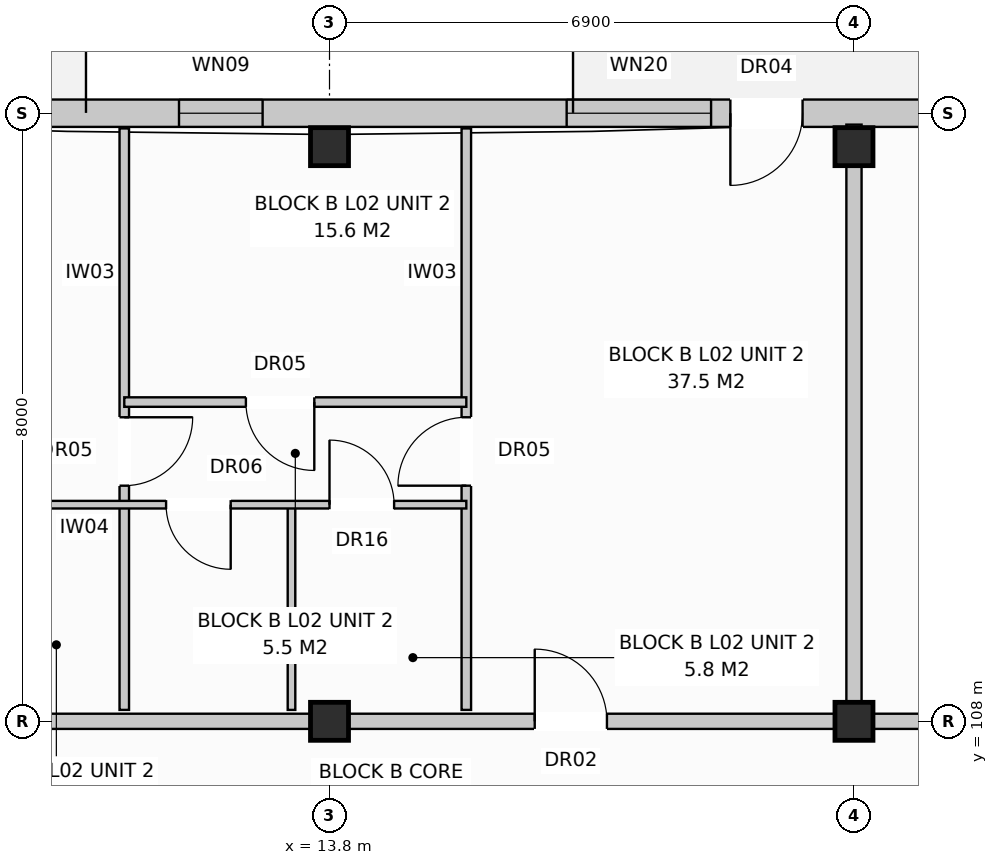
"""IFC4 building model, lengths in metres.
Left out: names, types, materials, properties, quantities, classifications, styles, units other than length and angle.
Written with IfcOpenShell. Run it as: python <this file> out.ifc"""

import sys

from ifc_helpers import new_model, si_unit, direction, frame, frame_2d, origin, origin_with_axes, origin_2d, place, context, subcontext, project, spatial, rectangle, extrude, element, fill, save


model = new_model("IFC4")
c1 = context("Model", 3, precision=1e-05, world=origin(), true_north=direction((0.0, 1.0)))
c2 = subcontext(c1, "Body", "Model", "MODEL_VIEW")
j1 = project(units=[si_unit("LENGTHUNIT", "METRE"), si_unit("PLANEANGLEUNIT", "RADIAN")], contexts=[c1])
p1 = place(None, origin())
s1 = spatial("IfcSite", under=j1, at=p1, CompositionType="ELEMENT")
p2 = place(p1, origin())
s2 = spatial("IfcBuilding", under=s1, at=p2, CompositionType="ELEMENT")
p3 = place(p2, frame((0.0, 0.0, 8.0)))
s3 = spatial("IfcBuildingStorey", under=s2, at=p3, CompositionType="ELEMENT", Elevation=8.0)
for number, where, z_axis, x_axis in (
    (1, (13.8, 108.0, 0.0), (0.0, 0.0, 1.0), (1.0, 0.0, 0.0)),
    (2, (13.8, 115.56, 0.0), (0.0, 0.0, 1.0), (1.0, 0.0, 0.0)),
    (3, (20.7, 108.0, 0.0), (0.0, 0.0, 1.0), (1.0, 0.0, 0.0)),
    (4, (20.7, 115.56, 0.0), (0.0, 0.0, 1.0), (1.0, 0.0, 0.0)),
):
    element("IfcColumn", number, at=place(p3, frame(where, z_axis=z_axis, x_axis=x_axis)), inside=s3, PredefinedType="COLUMN", context=c2, shape_type="SweptSolid", body=[
        extrude(rectangle(XDim=0.5, YDim=0.5, at=origin_2d()), origin(), (0.0, 0.0, 1.0), 3.2),
    ])
p4 = place(p3, frame((0.17, 116.0, 0.0), z_axis=(0.0, 0.0, 1.0), x_axis=(1.0, 0.0, 0.0)))
e5 = element("IfcWall", 5, at=p4, inside=s3, PredefinedType="STANDARD", context=c2, shape_type="SweptSolid", body=[
    extrude(rectangle(XDim=54.86, YDim=0.36, at=frame_2d((27.43, 0.0))), origin(), (0.0, 0.0, 1.0), 2.94),
])
p5 = place(p4, frame((5.1, 0.0, 0.0)))
e6 = element("IfcOpeningElement", 6, at=p5, cuts=e5, PredefinedType="OPENING", context=c2, shape_type="SweptSolid", body=[
    extrude(rectangle(XDim=0.95, YDim=2.1, at=frame_2d((0.475, 1.05))), frame((0.0, 0.192, 0.0), z_axis=(0.0, -1.0, 0.0), x_axis=(1.0, 0.0, 0.0)), (0.0, 0.0, 1.0), 0.384),
])
p6 = place(p4, frame((18.904, 0.0, 0.0)))
e7 = element("IfcOpeningElement", 7, at=p6, cuts=e5, PredefinedType="OPENING", context=c2, shape_type="SweptSolid", body=[
    extrude(rectangle(XDim=0.95, YDim=2.1, at=frame_2d((0.475, 1.05))), frame((0.0, 0.192, 0.0), z_axis=(0.0, -1.0, 0.0), x_axis=(1.0, 0.0, 0.0)), (0.0, 0.0, 1.0), 0.384),
])
p7 = place(p4, frame((32.704, 0.0, 0.0)))
e8 = element("IfcOpeningElement", 8, at=p7, cuts=e5, PredefinedType="OPENING", context=c2, shape_type="SweptSolid", body=[
    extrude(rectangle(XDim=0.95, YDim=2.1, at=frame_2d((0.475, 1.05))), frame((0.0, 0.192, 0.0), z_axis=(0.0, -1.0, 0.0), x_axis=(1.0, 0.0, 0.0)), (0.0, 0.0, 1.0), 0.384),
])
p8 = place(p4, frame((44.626, 0.0, 0.0)))
e9 = element("IfcOpeningElement", 9, at=p8, cuts=e5, PredefinedType="OPENING", context=c2, shape_type="SweptSolid", body=[
    extrude(rectangle(XDim=0.95, YDim=2.1, at=frame_2d((0.475, 1.05))), frame((0.0, 0.192, 0.0), z_axis=(0.0, -1.0, 0.0), x_axis=(1.0, 0.0, 0.0)), (0.0, 0.0, 1.0), 0.384),
])
p9 = place(p4, frame((1.25, 0.0, 0.72)))
e10 = element("IfcOpeningElement", 10, at=p9, cuts=e5, PredefinedType="OPENING", context=c2, shape_type="SweptSolid", body=[
    extrude(rectangle(XDim=1.1, YDim=1.5, at=frame_2d((0.55, 0.75))), frame((0.0, 0.192, 0.0), z_axis=(0.0, -1.0, 0.0), x_axis=(1.0, 0.0, 0.0)), (0.0, 0.0, 1.0), 0.384),
])
p10 = place(p4, frame((7.925, 0.0, 0.8)))
e11 = element("IfcOpeningElement", 11, at=p10, cuts=e5, PredefinedType="OPENING", context=c2, shape_type="SweptSolid", body=[
    extrude(rectangle(XDim=1.95, YDim=1.65, at=frame_2d((0.975, 0.825))), frame((0.0, 0.192, 0.0), z_axis=(0.0, -1.0, 0.0), x_axis=(1.0, 0.0, 0.0)), (0.0, 0.0, 1.0), 0.384),
])
p11 = place(p4, frame((11.65, 0.0, 0.72)))
e12 = element("IfcOpeningElement", 12, at=p11, cuts=e5, PredefinedType="OPENING", context=c2, shape_type="SweptSolid", body=[
    extrude(rectangle(XDim=1.1, YDim=1.5, at=frame_2d((0.55, 0.75))), frame((0.0, 0.192, 0.0), z_axis=(0.0, -1.0, 0.0), x_axis=(1.0, 0.0, 0.0)), (0.0, 0.0, 1.0), 0.384),
])
p12 = place(p4, frame((16.75, 0.0, 0.8)))
e13 = element("IfcOpeningElement", 13, at=p12, cuts=e5, PredefinedType="OPENING", context=c2, shape_type="SweptSolid", body=[
    extrude(rectangle(XDim=1.9, YDim=1.85, at=frame_2d((0.95, 0.925))), frame((0.0, 0.192, 0.0), z_axis=(0.0, -1.0, 0.0), x_axis=(1.0, 0.0, 0.0)), (0.0, 0.0, 1.0), 0.384),
])
p13 = place(p4, frame((22.225, 0.0, 0.8)))
e14 = element("IfcOpeningElement", 14, at=p13, cuts=e5, PredefinedType="OPENING", context=c2, shape_type="SweptSolid", body=[
    extrude(rectangle(XDim=1.95, YDim=1.65, at=frame_2d((0.975, 0.825))), frame((0.0, 0.192, 0.0), z_axis=(0.0, -1.0, 0.0), x_axis=(1.0, 0.0, 0.0)), (0.0, 0.0, 1.0), 0.384),
])
p14 = place(p4, frame((28.35, 0.0, 0.72)))
e15 = element("IfcOpeningElement", 15, at=p14, cuts=e5, PredefinedType="OPENING", context=c2, shape_type="SweptSolid", body=[
    extrude(rectangle(XDim=1.1, YDim=1.5, at=frame_2d((0.55, 0.75))), frame((0.0, 0.192, 0.0), z_axis=(0.0, -1.0, 0.0), x_axis=(1.0, 0.0, 0.0)), (0.0, 0.0, 1.0), 0.384),
])
p15 = place(p4, frame((30.55, 0.0, 0.8)))
e16 = element("IfcOpeningElement", 16, at=p15, cuts=e5, PredefinedType="OPENING", context=c2, shape_type="SweptSolid", body=[
    extrude(rectangle(XDim=1.9, YDim=1.85, at=frame_2d((0.95, 0.925))), frame((0.0, 0.192, 0.0), z_axis=(0.0, -1.0, 0.0), x_axis=(1.0, 0.0, 0.0)), (0.0, 0.0, 1.0), 0.384),
])
p16 = place(p4, frame((36.525, 0.0, 0.8)))
e17 = element("IfcOpeningElement", 17, at=p16, cuts=e5, PredefinedType="OPENING", context=c2, shape_type="SweptSolid", body=[
    extrude(rectangle(XDim=1.95, YDim=1.65, at=frame_2d((0.975, 0.825))), frame((0.0, 0.192, 0.0), z_axis=(0.0, -1.0, 0.0), x_axis=(1.0, 0.0, 0.0)), (0.0, 0.0, 1.0), 0.384),
])
p17 = place(p4, frame((42.65, 0.0, 0.72)))
e18 = element("IfcOpeningElement", 18, at=p17, cuts=e5, PredefinedType="OPENING", context=c2, shape_type="SweptSolid", body=[
    extrude(rectangle(XDim=1.1, YDim=1.5, at=frame_2d((0.55, 0.75))), frame((0.0, 0.192, 0.0), z_axis=(0.0, -1.0, 0.0), x_axis=(1.0, 0.0, 0.0)), (0.0, 0.0, 1.0), 0.384),
])
p18 = place(p4, frame((48.65, 0.0, 0.72)))
e19 = element("IfcOpeningElement", 19, at=p18, cuts=e5, PredefinedType="OPENING", context=c2, shape_type="SweptSolid", body=[
    extrude(rectangle(XDim=1.9, YDim=1.85, at=frame_2d((0.95, 0.925))), frame((0.0, 0.192, 0.0), z_axis=(0.0, -1.0, 0.0), x_axis=(1.0, 0.0, 0.0)), (0.0, 0.0, 1.0), 0.384),
])
p19 = place(p4, frame((52.45, 0.0, 0.72)))
e20 = element("IfcOpeningElement", 20, at=p19, cuts=e5, PredefinedType="OPENING", context=c2, shape_type="SweptSolid", body=[
    extrude(rectangle(XDim=1.1, YDim=1.5, at=frame_2d((0.55, 0.75))), frame((0.0, 0.192, 0.0), z_axis=(0.0, -1.0, 0.0), x_axis=(1.0, 0.0, 0.0)), (0.0, 0.0, 1.0), 0.384),
])
p20 = place(p3, frame((20.7, 108.15, 0.0), z_axis=(0.0, 0.0, 1.0), x_axis=(0.0, 1.0, 0.0)))
e21 = element("IfcWall", 21, at=p20, inside=s3, PredefinedType="PARTITIONING", context=c2, shape_type="SweptSolid", body=[
    extrude(rectangle(XDim=7.7, YDim=0.2, at=frame_2d((3.85, 0.0))), origin(), (0.0, 0.0, 1.0), 2.94),
])
p21 = place(p3, frame((6.9, 108.0, 0.0), z_axis=(0.0, 0.0, 1.0), x_axis=(1.0, 0.0, 0.0)))
e22 = element("IfcWall", 22, at=p21, inside=s3, PredefinedType="PARTITIONING", context=c2, shape_type="SweptSolid", body=[
    extrude(rectangle(XDim=13.8, YDim=0.2, at=frame_2d((6.9, 0.0))), origin(), (0.0, 0.0, 1.0), 2.38),
])
p22 = place(p21, frame((9.6, 0.0, 0.0)))
e23 = element("IfcOpeningElement", 23, at=p22, cuts=e22, PredefinedType="OPENING", context=c2, shape_type="SweptSolid", body=[
    extrude(rectangle(XDim=0.95, YDim=2.15, at=frame_2d((0.475, 1.075))), frame((0.0, 0.112, 0.0), z_axis=(0.0, -1.0, 0.0), x_axis=(1.0, 0.0, 0.0)), (0.0, 0.0, 1.0), 0.224),
])
p23 = place(p3, frame((15.6, 108.15, 0.0), z_axis=(0.0, 0.0, 1.0), x_axis=(0.0, 1.0, 0.0)))
e24 = element("IfcWall", 24, at=p23, inside=s3, PredefinedType="PARTITIONING", context=c2, shape_type="SweptSolid", body=[
    extrude(rectangle(XDim=7.65, YDim=0.125, at=frame_2d((3.825, 0.0))), origin(), (0.0, 0.0, 1.0), 2.94),
])
p24 = place(p23, frame((2.95, 0.0, 0.0)))
e25 = element("IfcOpeningElement", 25, at=p24, cuts=e24, PredefinedType="OPENING", context=c2, shape_type="SweptSolid", body=[
    extrude(rectangle(XDim=0.9, YDim=2.1, at=frame_2d((0.45, 1.05))), frame((0.0, 0.074, 0.0), z_axis=(0.0, -1.0, 0.0), x_axis=(1.0, 0.0, 0.0)), (0.0, 0.0, 1.0), 0.149),
])
p25 = place(p3, frame((11.1, 108.15, 0.0), z_axis=(0.0, 0.0, 1.0), x_axis=(0.0, 1.0, 0.0)))
e26 = element("IfcWall", 26, at=p25, inside=s3, PredefinedType="PARTITIONING", context=c2, shape_type="SweptSolid", body=[
    extrude(rectangle(XDim=7.65, YDim=0.125, at=frame_2d((3.825, 0.0))), origin(), (0.0, 0.0, 1.0), 2.94),
])
p26 = place(p25, frame((2.95, 0.0, 0.0)))
e27 = element("IfcOpeningElement", 27, at=p26, cuts=e26, PredefinedType="OPENING", context=c2, shape_type="SweptSolid", body=[
    extrude(rectangle(XDim=0.9, YDim=2.1, at=frame_2d((0.45, 1.05))), frame((0.0, 0.074, 0.0), z_axis=(0.0, -1.0, 0.0), x_axis=(1.0, 0.0, 0.0)), (0.0, 0.0, 1.0), 0.149),
])
p27 = place(p3, frame((13.3, 108.15, 0.0), z_axis=(0.0, 0.0, 1.0), x_axis=(0.0, 1.0, 0.0)))
e28 = element("IfcWall", 28, at=p27, inside=s3, PredefinedType="PARTITIONING", context=c2, shape_type="SweptSolid", body=[
    extrude(rectangle(XDim=2.7, YDim=0.1, at=frame_2d((1.35, 0.0))), origin(), (0.0, 0.0, 1.0), 2.94),
])
p28 = place(p3, frame((7.0, 110.85, 0.0), z_axis=(0.0, 0.0, 1.0), x_axis=(1.0, 0.0, 0.0)))
e29 = element("IfcWall", 29, at=p28, inside=s3, PredefinedType="PARTITIONING", context=c2, shape_type="SweptSolid", body=[
    extrude(rectangle(XDim=8.6, YDim=0.1, at=frame_2d((4.3, 0.0))), origin(), (0.0, 0.0, 1.0), 2.94),
])
p29 = place(p28, frame((1.4, 0.0, 0.0)))
e30 = element("IfcOpeningElement", 30, at=p29, cuts=e29, PredefinedType="OPENING", context=c2, shape_type="SweptSolid", body=[
    extrude(rectangle(XDim=0.85, YDim=2.05, at=frame_2d((0.425, 1.025))), frame((0.0, 0.062, 0.0), z_axis=(0.0, -1.0, 0.0), x_axis=(1.0, 0.0, 0.0)), (0.0, 0.0, 1.0), 0.124),
])
p30 = place(p28, frame((4.65, 0.0, 0.0)))
e31 = element("IfcOpeningElement", 31, at=p30, cuts=e29, PredefinedType="OPENING", context=c2, shape_type="SweptSolid", body=[
    extrude(rectangle(XDim=0.85, YDim=2.05, at=frame_2d((0.425, 1.025))), frame((0.0, 0.062, 0.0), z_axis=(0.0, -1.0, 0.0), x_axis=(1.0, 0.0, 0.0)), (0.0, 0.0, 1.0), 0.124),
])
p31 = place(p28, frame((6.8, 0.0, 0.0)))
e32 = element("IfcOpeningElement", 32, at=p31, cuts=e29, PredefinedType="OPENING", context=c2, shape_type="SweptSolid", body=[
    extrude(rectangle(XDim=0.85, YDim=2.1, at=frame_2d((0.425, 1.05))), frame((0.0, 0.062, 0.0), z_axis=(0.0, -1.0, 0.0), x_axis=(1.0, 0.0, 0.0)), (0.0, 0.0, 1.0), 0.124),
])
p32 = place(p3, frame((11.1, 112.2, 0.0), z_axis=(0.0, 0.0, 1.0), x_axis=(1.0, 0.0, 0.0)))
e33 = element("IfcWall", 33, at=p32, inside=s3, PredefinedType="PARTITIONING", context=c2, shape_type="SweptSolid", body=[
    extrude(rectangle(XDim=4.5, YDim=0.125, at=frame_2d((2.25, 0.0))), origin(), (0.0, 0.0, 1.0), 2.94),
])
p33 = place(p32, frame((1.6, 0.0, 0.0)))
e34 = element("IfcOpeningElement", 34, at=p33, cuts=e33, PredefinedType="OPENING", context=c2, shape_type="SweptSolid", body=[
    extrude(rectangle(XDim=0.9, YDim=2.1, at=frame_2d((0.45, 1.05))), frame((0.0, 0.074, 0.0), z_axis=(0.0, -1.0, 0.0), x_axis=(1.0, 0.0, 0.0)), (0.0, 0.0, 1.0), 0.149),
])
p34 = place(p3, frame((20.7, 108.0, 0.0), z_axis=(0.0, 0.0, 1.0), x_axis=(1.0, 0.0, 0.0)))
e35 = element("IfcWall", 35, at=p34, inside=s3, PredefinedType="PARTITIONING", context=c2, shape_type="SweptSolid", body=[
    extrude(rectangle(XDim=13.8, YDim=0.2, at=frame_2d((6.9, 0.0))), origin(), (0.0, 0.0, 1.0), 2.38),
])
p35 = place(p34, frame((2.4, 0.0, 0.0)))
e36 = element("IfcOpeningElement", 36, at=p35, cuts=e35, PredefinedType="OPENING", context=c2, shape_type="SweptSolid", body=[
    extrude(rectangle(XDim=0.95, YDim=2.15, at=frame_2d((0.475, 1.075))), frame((0.0, 0.112, 0.0), z_axis=(0.0, -1.0, 0.0), x_axis=(1.0, 0.0, 0.0)), (0.0, 0.0, 1.0), 0.224),
])
p36 = place(p6, frame((0.95, 0.0, 0.0), z_axis=(0.0, 0.0, 1.0), x_axis=(-1.0, 0.0, 0.0)))
e37 = element("IfcDoor", 37, at=p36, inside=s3, OperationType="SINGLE_SWING_LEFT", PredefinedType="DOOR", context=c2, shape_type="SweptSolid", body=[
    extrude(rectangle(XDim=0.95, YDim=2.1, at=frame_2d((0.475, 1.05))), frame((0.0, 0.025, 0.0), z_axis=(0.0, -1.0, 0.0), x_axis=(1.0, 0.0, 0.0)), (0.0, 0.0, 1.0), 0.05),
])
fill(e7, e37)
p37 = place(p11, origin_with_axes())
e38 = element("IfcWindow", 38, at=p37, inside=s3, PartitioningType="SINGLE_PANEL", PredefinedType="WINDOW", context=c2, shape_type="SweptSolid", body=[
    extrude(rectangle(XDim=1.1, YDim=1.5, at=frame_2d((0.55, 0.75))), frame((0.0, 0.03, 0.0), z_axis=(0.0, -1.0, 0.0), x_axis=(1.0, 0.0, 0.0)), (0.0, 0.0, 1.0), 0.06),
])
fill(e12, e38)
p38 = place(p12, origin_with_axes())
e39 = element("IfcWindow", 39, at=p38, inside=s3, PartitioningType="SINGLE_PANEL", PredefinedType="WINDOW", context=c2, shape_type="SweptSolid", body=[
    extrude(rectangle(XDim=1.9, YDim=1.85, at=frame_2d((0.95, 0.925))), frame((0.0, 0.03, 0.0), z_axis=(0.0, -1.0, 0.0), x_axis=(1.0, 0.0, 0.0)), (0.0, 0.0, 1.0), 0.06),
])
fill(e13, e39)
p39 = place(p22, origin_with_axes())
e40 = element("IfcDoor", 40, at=p39, inside=s3, OperationType="SINGLE_SWING_LEFT", PredefinedType="DOOR", context=c2, shape_type="SweptSolid", body=[
    extrude(rectangle(XDim=0.95, YDim=2.15, at=frame_2d((0.475, 1.075))), frame((0.0, 0.025, 0.0), z_axis=(0.0, -1.0, 0.0), x_axis=(1.0, 0.0, 0.0)), (0.0, 0.0, 1.0), 0.05),
])
fill(e23, e40)
p40 = place(p24, origin_with_axes())
e41 = element("IfcDoor", 41, at=p40, inside=s3, OperationType="SINGLE_SWING_LEFT", PredefinedType="DOOR", context=c2, shape_type="SweptSolid", body=[
    extrude(rectangle(XDim=0.9, YDim=2.1, at=frame_2d((0.45, 1.05))), frame((0.0, 0.025, 0.0), z_axis=(0.0, -1.0, 0.0), x_axis=(1.0, 0.0, 0.0)), (0.0, 0.0, 1.0), 0.05),
])
fill(e25, e41)
p41 = place(p26, frame((0.9, 0.0, 0.0), z_axis=(0.0, 0.0, 1.0), x_axis=(-1.0, 0.0, 0.0)))
e42 = element("IfcDoor", 42, at=p41, inside=s3, OperationType="SINGLE_SWING_RIGHT", PredefinedType="DOOR", context=c2, shape_type="SweptSolid", body=[
    extrude(rectangle(XDim=0.9, YDim=2.1, at=frame_2d((0.45, 1.05))), frame((0.0, 0.025, 0.0), z_axis=(0.0, -1.0, 0.0), x_axis=(1.0, 0.0, 0.0)), (0.0, 0.0, 1.0), 0.05),
])
fill(e27, e42)
p42 = place(p30, frame((0.85, 0.0, 0.0), z_axis=(0.0, 0.0, 1.0), x_axis=(-1.0, 0.0, 0.0)))
e43 = element("IfcDoor", 43, at=p42, inside=s3, OperationType="SINGLE_SWING_RIGHT", PredefinedType="DOOR", context=c2, shape_type="SweptSolid", body=[
    extrude(rectangle(XDim=0.85, YDim=2.05, at=frame_2d((0.425, 1.025))), frame((0.0, 0.025, 0.0), z_axis=(0.0, -1.0, 0.0), x_axis=(1.0, 0.0, 0.0)), (0.0, 0.0, 1.0), 0.05),
])
fill(e31, e43)
p43 = place(p31, origin_with_axes())
e44 = element("IfcDoor", 44, at=p43, inside=s3, OperationType="SINGLE_SWING_LEFT", PredefinedType="DOOR", context=c2, shape_type="SweptSolid", body=[
    extrude(rectangle(XDim=0.85, YDim=2.1, at=frame_2d((0.425, 1.05))), frame((0.0, 0.025, 0.0), z_axis=(0.0, -1.0, 0.0), x_axis=(1.0, 0.0, 0.0)), (0.0, 0.0, 1.0), 0.05),
])
fill(e32, e44)
p44 = place(p33, frame((0.9, 0.0, 0.0), z_axis=(0.0, 0.0, 1.0), x_axis=(-1.0, 0.0, 0.0)))
e45 = element("IfcDoor", 45, at=p44, inside=s3, OperationType="SINGLE_SWING_RIGHT", PredefinedType="DOOR", context=c2, shape_type="SweptSolid", body=[
    extrude(rectangle(XDim=0.9, YDim=2.1, at=frame_2d((0.45, 1.05))), frame((0.0, 0.025, 0.0), z_axis=(0.0, -1.0, 0.0), x_axis=(1.0, 0.0, 0.0)), (0.0, 0.0, 1.0), 0.05),
])
fill(e34, e45)
save(model, sys.argv[1])
